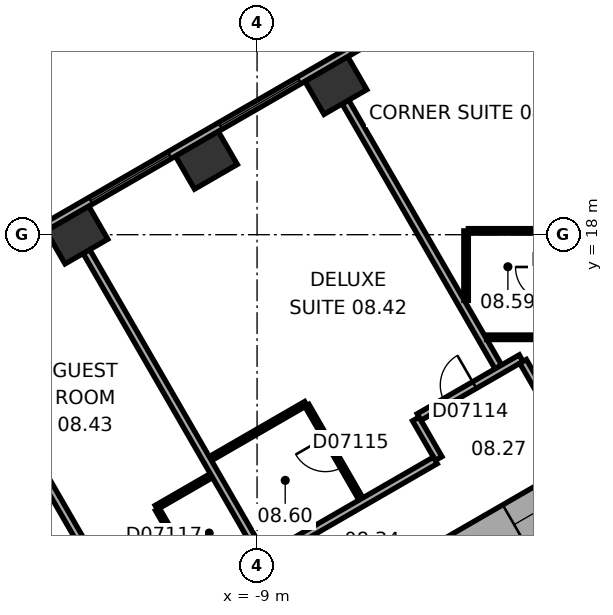
"""IFC4 building model, lengths in metres.
Left out: names, types, materials, properties, quantities, classifications, styles, units other than length and angle.
Written with IfcOpenShell. Run it as: python <this file> out.ifc"""

import sys

from ifc_helpers import new_model, si_unit, direction, frame, frame_2d, origin, origin_2d, place, context, subcontext, project, spatial, rectangle, extrude, element, fill, save


model = new_model("IFC4")
c1 = context("Model", 3, precision=1e-05, world=origin(), true_north=direction((0.0, 1.0)))
c2 = subcontext(c1, "Body", "Model", "MODEL_VIEW")
j1 = project(units=[si_unit("LENGTHUNIT", "METRE"), si_unit("PLANEANGLEUNIT", "RADIAN")], contexts=[c1])
p1 = place(None, origin())
s1 = spatial("IfcSite", under=j1, at=p1, CompositionType="ELEMENT")
p2 = place(p1, origin())
s2 = spatial("IfcBuilding", under=s1, at=p2, CompositionType="ELEMENT")
p3 = place(p2, frame((0.0, 0.0, 47.3)))
s3 = spatial("IfcBuildingStorey", under=s2, at=p3, CompositionType="ELEMENT", Elevation=47.3)
for number, where, z_axis, x_axis in (
    (1, (-6.926, 21.925, 0.0), (0.0, 0.0, 1.0), (-0.866, -0.5, 0.0)),
    (2, (-10.333, 19.957, 0.0), (0.0, 0.0, 1.0), (-0.866, -0.5, 0.0)),
    (3, (-13.74, 17.99, 0.0), (0.0, 0.0, 1.0), (-0.866, -0.5, 0.0)),
):
    element("IfcColumn", number, at=place(p3, frame(where, z_axis=z_axis, x_axis=x_axis)), inside=s3, PredefinedType="COLUMN", context=c2, shape_type="SweptSolid", body=[
        extrude(rectangle(XDim=1.3, YDim=1.0, at=origin_2d()), origin(), (0.0, 0.0, 1.0), 3.3),
    ])
p4 = place(p3, frame((0.3, 11.836, 0.0), z_axis=(0.0, 0.0, 1.0), x_axis=(-0.866021384402, -0.500006961711, 0.0)))
e4 = element("IfcWall", 4, at=p4, inside=s3, PredefinedType="SHEAR", context=c2, shape_type="SweptSolid", body=[
    extrude(rectangle(XDim=12.355, YDim=1.2, at=frame_2d((6.178, 0.0))), origin(), (0.0, 0.0, 1.0), 3.3),
])
p5 = place(p4, frame((6.378, 0.0, 0.0)))
e5 = element("IfcOpeningElement", 5, at=p5, cuts=e4, PredefinedType="OPENING", context=c2, shape_type="SweptSolid", body=[
    extrude(rectangle(XDim=1.5, YDim=2.1, at=frame_2d((0.75, 1.05))), frame((0.0, 0.61, 0.0), z_axis=(0.0, -1.0, 0.0), x_axis=(1.0, 0.0, 0.0)), (0.0, 0.0, 1.0), 1.22),
])
p6 = place(p4, frame((1.828, 0.0, 0.0)))
e6 = element("IfcOpeningElement", 6, at=p6, cuts=e4, PredefinedType="OPENING", context=c2, shape_type="SweptSolid", body=[
    extrude(rectangle(XDim=1.1, YDim=2.1, at=frame_2d((0.55, 1.05))), frame((0.0, 0.61, 0.0), z_axis=(0.0, -1.0, 0.0), x_axis=(1.0, 0.0, 0.0)), (0.0, 0.0, 1.0), 1.22),
])
p7 = place(p3, frame((-3.136, 24.805, 0.0), z_axis=(0.0, 0.0, 1.0), x_axis=(-0.866028291626, -0.499994998079, 0.0)))
e7 = element("IfcWall", 7, at=p7, inside=s3, PredefinedType="STANDARD", context=c2, shape_type="SweptSolid", body=[
    extrude(rectangle(XDim=21.246, YDim=0.2, at=frame_2d((10.623, 0.0))), origin(), (0.0, 0.0, 1.0), 3.3),
])
p8 = place(p7, frame((1.555, 0.0, 0.8)))
e8 = element("IfcOpeningElement", 8, at=p8, cuts=e7, PredefinedType="OPENING", context=c2, shape_type="SweptSolid", body=[
    extrude(rectangle(XDim=2.4, YDim=1.7, at=frame_2d((1.2, 0.85))), frame((0.0, 0.11, 0.0), z_axis=(0.0, -1.0, 0.0), x_axis=(1.0, 0.0, 0.0)), (0.0, 0.0, 1.0), 0.22),
])
p9 = place(p7, frame((5.489, 0.0, 0.8)))
e9 = element("IfcOpeningElement", 9, at=p9, cuts=e7, PredefinedType="OPENING", context=c2, shape_type="SweptSolid", body=[
    extrude(rectangle(XDim=2.4, YDim=1.7, at=frame_2d((1.2, 0.85))), frame((0.0, 0.11, 0.0), z_axis=(0.0, -1.0, 0.0), x_axis=(1.0, 0.0, 0.0)), (0.0, 0.0, 1.0), 0.22),
])
p10 = place(p7, frame((9.424, 0.0, 0.8)))
e10 = element("IfcOpeningElement", 10, at=p10, cuts=e7, PredefinedType="OPENING", context=c2, shape_type="SweptSolid", body=[
    extrude(rectangle(XDim=2.4, YDim=1.7, at=frame_2d((1.2, 0.85))), frame((0.0, 0.11, 0.0), z_axis=(0.0, -1.0, 0.0), x_axis=(1.0, 0.0, 0.0)), (0.0, 0.0, 1.0), 0.22),
])
p11 = place(p7, frame((13.358, 0.0, 0.8)))
e11 = element("IfcOpeningElement", 11, at=p11, cuts=e7, PredefinedType="OPENING", context=c2, shape_type="SweptSolid", body=[
    extrude(rectangle(XDim=2.4, YDim=1.7, at=frame_2d((1.2, 0.85))), frame((0.0, 0.11, 0.0), z_axis=(0.0, -1.0, 0.0), x_axis=(1.0, 0.0, 0.0)), (0.0, 0.0, 1.0), 0.22),
])
p12 = place(p7, frame((17.293, 0.0, 0.8)))
e12 = element("IfcOpeningElement", 12, at=p12, cuts=e7, PredefinedType="OPENING", context=c2, shape_type="SweptSolid", body=[
    extrude(rectangle(XDim=2.4, YDim=1.7, at=frame_2d((1.2, 0.85))), frame((0.0, 0.11, 0.0), z_axis=(0.0, -1.0, 0.0), x_axis=(1.0, 0.0, 0.0)), (0.0, 0.0, 1.0), 0.22),
])
p13 = place(p3, frame((-16.898, 15.59, 0.0), z_axis=(0.0, 0.0, 1.0), x_axis=(0.500023458698, -0.866011859475, 0.0)))
e13 = element("IfcWall", 13, at=p13, inside=s3, PredefinedType="PARTITIONING", context=c2, shape_type="SweptSolid", body=[
    extrude(rectangle(XDim=9.572, YDim=0.2, at=frame_2d((4.786, 0.0))), origin(), (0.0, 0.0, 1.0), 3.05),
])
p14 = place(p3, frame((-11.651, 10.825, 0.0), z_axis=(0.0, 0.0, 1.0), x_axis=(0.865998477143, 0.500046635412, 0.0)))
e14 = element("IfcWall", 14, at=p14, inside=s3, PredefinedType="PARTITIONING", context=c2, shape_type="SweptSolid", body=[
    extrude(rectangle(XDim=1.673, YDim=0.12, at=frame_2d((0.836, 0.0))), origin(), (0.0, 0.0, 1.0), 3.05),
])
p15 = place(p3, frame((-10.401, 8.66, 0.0), z_axis=(0.0, 0.0, 1.0), x_axis=(-0.500077547548, 0.865980627057, 0.0)))
e15 = element("IfcWall", 15, at=p15, inside=s3, PredefinedType="PARTITIONING", context=c2, shape_type="SweptSolid", body=[
    extrude(rectangle(XDim=2.44, YDim=0.12, at=frame_2d((1.22, 0.0))), origin(), (0.0, 0.0, 1.0), 3.05),
])
p16 = place(p15, frame((0.77, 0.0, 0.0)))
e16 = element("IfcOpeningElement", 16, at=p16, cuts=e15, PredefinedType="OPENING", context=c2, shape_type="SweptSolid", body=[
    extrude(rectangle(XDim=0.9, YDim=2.1, at=frame_2d((0.45, 1.05))), frame((0.0, 0.07, 0.0), z_axis=(0.0, -1.0, 0.0), x_axis=(1.0, 0.0, 0.0)), (0.0, 0.0, 1.0), 0.14),
])
p17 = place(p3, frame((-10.229, 12.108, 0.0), z_axis=(0.0, 0.0, 1.0), x_axis=(0.866032775405, 0.499987231761, 0.0)))
e17 = element("IfcWall", 17, at=p17, inside=s3, PredefinedType="PARTITIONING", context=c2, shape_type="SweptSolid", body=[
    extrude(rectangle(XDim=2.9, YDim=0.12, at=frame_2d((1.45, 0.0))), origin(), (0.0, 0.0, 1.0), 3.05),
])
p18 = place(p3, frame((-7.865, 7.814, 0.0), z_axis=(0.0, 0.0, 1.0), x_axis=(-0.500004234368, 0.866022959057, 0.0)))
e18 = element("IfcWall", 18, at=p18, inside=s3, PredefinedType="PARTITIONING", context=c2, shape_type="SweptSolid", body=[
    extrude(rectangle(XDim=11.25, YDim=0.2, at=frame_2d((5.625, 0.0))), origin(), (0.0, 0.0, 1.0), 3.05),
])
p19 = place(p18, frame((0.5, 0.0, 0.0)))
e19 = element("IfcOpeningElement", 19, at=p19, cuts=e18, PredefinedType="OPENING", context=c2, shape_type="SweptSolid", body=[
    extrude(rectangle(XDim=0.9, YDim=2.1, at=frame_2d((0.45, 1.05))), frame((0.0, 0.11, 0.0), z_axis=(0.0, -1.0, 0.0), x_axis=(1.0, 0.0, 0.0)), (0.0, 0.0, 1.0), 0.22),
])
p20 = place(p3, frame((-7.687, 13.506, 0.0), z_axis=(0.0, 0.0, 1.0), x_axis=(0.499985389037, -0.866033839264, 0.0)))
e20 = element("IfcWall", 20, at=p20, inside=s3, PredefinedType="PARTITIONING", context=c2, shape_type="SweptSolid", body=[
    extrude(rectangle(XDim=2.84, YDim=0.12, at=frame_2d((1.42, 0.0))), origin(), (0.0, 0.0, 1.0), 2.6),
])
p21 = place(p20, frame((0.97, 0.0, 0.0)))
e21 = element("IfcOpeningElement", 21, at=p21, cuts=e20, PredefinedType="OPENING", context=c2, shape_type="SweptSolid", body=[
    extrude(rectangle(XDim=0.9, YDim=2.1, at=frame_2d((0.45, 1.05))), frame((0.0, 0.07, 0.0), z_axis=(0.0, -1.0, 0.0), x_axis=(1.0, 0.0, 0.0)), (0.0, 0.0, 1.0), 0.14),
])
p22 = place(p3, frame((-6.676, 21.492, 0.0), z_axis=(0.0, 0.0, 1.0), x_axis=(0.500011263043, -0.866018900966, 0.0)))
e22 = element("IfcWall", 22, at=p22, inside=s3, PredefinedType="PARTITIONING", context=c2, shape_type="SweptSolid", body=[
    extrude(rectangle(XDim=8.049, YDim=0.2, at=frame_2d((4.024, 0.0))), origin(), (0.0, 0.0, 1.0), 3.05),
])
p23 = place(p3, frame((-4.823, 13.152, 0.0), z_axis=(0.0, 0.0, 1.0), x_axis=(0.499986357472, -0.866033280158, 0.0)))
e23 = element("IfcWall", 23, at=p23, inside=s3, PredefinedType="PARTITIONING", context=c2, shape_type="SweptSolid", body=[
    extrude(rectangle(XDim=1.201, YDim=0.2, at=frame_2d((0.601, 0.0))), origin(), (0.0, 0.0, 1.0), 3.05),
])
p24 = place(p3, frame((-4.309, 12.061, 0.0), z_axis=(0.0, 0.0, 1.0), x_axis=(-0.866020679205, -0.500008183122, 0.0)))
e24 = element("IfcWall", 24, at=p24, inside=s3, PredefinedType="PARTITIONING", context=c2, shape_type="SweptSolid", body=[
    extrude(rectangle(XDim=5.104, YDim=0.2, at=frame_2d((2.552, 0.0))), origin(), (0.0, 0.0, 1.0), 3.05),
])
p25 = place(p3, frame((-3.5, 16.271, 0.0), z_axis=(0.0, 0.0, 1.0), x_axis=(0.0, 1.0, 0.0)))
e25 = element("IfcWall", 25, at=p25, inside=s3, PredefinedType="PARTITIONING", context=c2, shape_type="SweptSolid", body=[
    extrude(rectangle(XDim=1.829, YDim=0.12, at=frame_2d((0.915, 0.0))), origin(), (0.0, 0.0, 1.0), 3.05),
])
p26 = place(p3, frame((-3.44, 18.101, 0.0), z_axis=(0.0, 0.0, 1.0), x_axis=(1.0, 0.0, 0.0)))
e26 = element("IfcWall", 26, at=p26, inside=s3, PredefinedType="PARTITIONING", context=c2, shape_type="SweptSolid", body=[
    extrude(rectangle(XDim=2.14, YDim=0.12, at=frame_2d((1.07, 0.0))), origin(), (0.0, 0.0, 1.0), 3.05),
])
p27 = place(p3, frame((-2.05, 14.752, 0.0), z_axis=(0.0, 0.0, 1.0), x_axis=(-0.866030936828, -0.499990416364, 0.0)))
e27 = element("IfcWall", 27, at=p27, inside=s3, PredefinedType="PARTITIONING", context=c2, shape_type="SweptSolid", body=[
    extrude(rectangle(XDim=3.102, YDim=0.2, at=frame_2d((1.551, 0.0))), origin(), (0.0, 0.0, 1.0), 3.05),
])
p28 = place(p27, frame((1.419, 0.0, 0.0)))
e28 = element("IfcOpeningElement", 28, at=p28, cuts=e27, PredefinedType="OPENING", context=c2, shape_type="SweptSolid", body=[
    extrude(rectangle(XDim=0.9, YDim=2.1, at=frame_2d((0.45, 1.05))), frame((0.0, 0.11, 0.0), z_axis=(0.0, -1.0, 0.0), x_axis=(1.0, 0.0, 0.0)), (0.0, 0.0, 1.0), 0.22),
])
p29 = place(p3, frame((-1.449, 13.712, 0.0), z_axis=(0.0, 0.0, 1.0), x_axis=(-0.499978356969, 0.866037899034, 0.0)))
e29 = element("IfcWall", 29, at=p29, inside=s3, PredefinedType="PARTITIONING", context=c2, shape_type="SweptSolid", body=[
    extrude(rectangle(XDim=1.101, YDim=0.2, at=frame_2d((0.551, 0.0))), origin(), (0.0, 0.0, 1.0), 3.05),
])
p30 = place(p3, frame((-1.3, 15.301, 0.0), z_axis=(0.0, 0.0, 1.0), x_axis=(-1.0, 0.0, 0.0)))
e30 = element("IfcWall", 30, at=p30, inside=s3, PredefinedType="PARTITIONING", context=c2, shape_type="SweptSolid", body=[
    extrude(rectangle(XDim=1.661, YDim=0.12, at=frame_2d((0.831, 0.0))), origin(), (0.0, 0.0, 1.0), 3.05),
])
p31 = place(p9, origin())
e31 = element("IfcWindow", 31, at=p31, inside=s3, PartitioningType="SINGLE_PANEL", PredefinedType="WINDOW", context=c2, shape_type="SweptSolid", body=[
    extrude(rectangle(XDim=2.4, YDim=1.7, at=frame_2d((1.2, 0.85))), frame((0.0, 0.03, 0.0), z_axis=(0.0, -1.0, 0.0), x_axis=(1.0, 0.0, 0.0)), (0.0, 0.0, 1.0), 0.06),
])
fill(e9, e31)
p32 = place(p10, origin())
e32 = element("IfcWindow", 32, at=p32, inside=s3, PartitioningType="SINGLE_PANEL", PredefinedType="WINDOW", context=c2, shape_type="SweptSolid", body=[
    extrude(rectangle(XDim=2.4, YDim=1.7, at=frame_2d((1.2, 0.85))), frame((0.0, 0.03, 0.0), z_axis=(0.0, -1.0, 0.0), x_axis=(1.0, 0.0, 0.0)), (0.0, 0.0, 1.0), 0.06),
])
fill(e10, e32)
p33 = place(p6, origin())
e33 = element("IfcDoor", 33, at=p33, inside=s3, OperationType="DOUBLE_DOOR_SLIDING", PredefinedType="DOOR", context=c2, shape_type="SweptSolid", body=[
    extrude(rectangle(XDim=1.1, YDim=2.1, at=frame_2d((0.55, 1.05))), frame((0.0, 0.025, 0.0), z_axis=(0.0, -1.0, 0.0), x_axis=(1.0, 0.0, 0.0)), (0.0, 0.0, 1.0), 0.05),
])
fill(e6, e33)
p34 = place(p28, origin())
e34 = element("IfcDoor", 34, at=p34, inside=s3, OperationType="SINGLE_SWING_LEFT", PredefinedType="DOOR", context=c2, shape_type="SweptSolid", body=[
    extrude(rectangle(XDim=0.9, YDim=2.1, at=frame_2d((0.45, 1.05))), frame((0.0, 0.025, 0.0), z_axis=(0.0, -1.0, 0.0), x_axis=(1.0, 0.0, 0.0)), (0.0, 0.0, 1.0), 0.05),
])
fill(e28, e34)
p35 = place(p21, origin())
e35 = element("IfcDoor", 35, at=p35, inside=s3, OperationType="SINGLE_SWING_LEFT", PredefinedType="DOOR", context=c2, shape_type="SweptSolid", body=[
    extrude(rectangle(XDim=0.9, YDim=2.1, at=frame_2d((0.45, 1.05))), frame((0.0, 0.025, 0.0), z_axis=(0.0, -1.0, 0.0), x_axis=(1.0, 0.0, 0.0)), (0.0, 0.0, 1.0), 0.05),
])
fill(e21, e35)
p36 = place(p16, origin())
e36 = element("IfcDoor", 36, at=p36, inside=s3, OperationType="SINGLE_SWING_LEFT", PredefinedType="DOOR", context=c2, shape_type="SweptSolid", body=[
    extrude(rectangle(XDim=0.9, YDim=2.1, at=frame_2d((0.45, 1.05))), frame((0.0, 0.025, 0.0), z_axis=(0.0, -1.0, 0.0), x_axis=(1.0, 0.0, 0.0)), (0.0, 0.0, 1.0), 0.05),
])
fill(e16, e36)
save(model, sys.argv[1])
